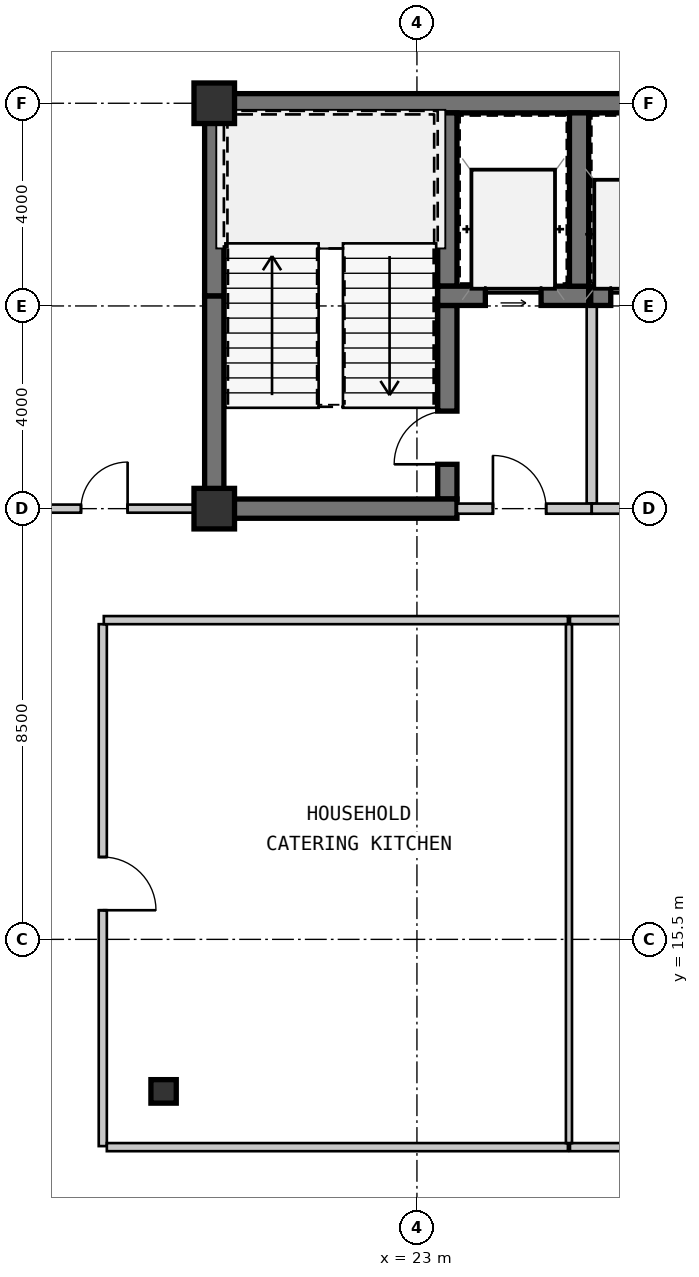
"""IFC4 building model, lengths in metres.
Left out: names, types, materials, properties, quantities, classifications, styles, units other than length and angle.
Written with IfcOpenShell. Run it as: python <this file> out.ifc"""

import sys

from ifc_helpers import new_model, si_unit, direction, frame, frame_2d, origin, origin_2d, place, context, subcontext, project, spatial, rectangle, i_section, extrude, source, transform, mapped, element, fill, save


model = new_model("IFC4")
c1 = context("Model", 3, precision=1e-05, world=origin(), true_north=direction((0.0, 1.0)))
c2 = subcontext(c1, "Body", "Model", "MODEL_VIEW")
j1 = project(units=[si_unit("LENGTHUNIT", "METRE"), si_unit("PLANEANGLEUNIT", "RADIAN")], contexts=[c1])
p1 = place(None, origin())
s1 = spatial("IfcSite", under=j1, at=p1, CompositionType="ELEMENT")
p2 = place(p1, origin())
s2 = spatial("IfcBuilding", under=s1, at=p2, CompositionType="ELEMENT")
p3 = place(p2, frame((0.0, 0.0, 57.75)))
s3 = spatial("IfcBuildingStorey", under=s2, at=p3, CompositionType="ELEMENT", Elevation=57.75)
m1 = source(origin(), c2, "Body", "SweptSolid", [
    extrude(rectangle(XDim=0.8, YDim=0.8, at=origin_2d()), origin(), (0.0, 0.0, 1.0), 3.15),
])
for number, where, z_axis, x_axis in (
    (1, (19.0, 24.0, 0.0), (0.0, 0.0, 1.0), (1.0, 0.0, 0.0)),
    (2, (19.0, 32.0, 0.0), (0.0, 0.0, 1.0), (1.0, 0.0, 0.0)),
):
    element("IfcColumn", number, at=place(p3, frame(where, z_axis=z_axis, x_axis=x_axis)), inside=s3, PredefinedType="COLUMN", context=c2, shape_type="MappedRepresentation", body=[
        mapped(m1, transform((0.0, 0.0, 0.0), scale=1.0)),
    ])
m2 = source(origin(), c2, "Body", "SweptSolid", [
    extrude(i_section(OverallWidth=0.5, OverallDepth=0.464, WebThickness=0.022, FlangeThickness=0.034, at=origin_2d()), origin(), (0.0, 0.0, 1.0), 3.15),
])
p4 = place(p3, frame((18.0, 12.5, 0.0), z_axis=(0.0, 0.0, 1.0), x_axis=(1.0, 0.0, 0.0)))
e3 = element("IfcColumn", 3, at=p4, inside=s3, PredefinedType="COLUMN", context=c2, shape_type="MappedRepresentation", body=[
    mapped(m2, transform((0.0, 0.0, 0.0), scale=1.0)),
])
m3 = source(origin(), c2, "Body", "SweptSolid", [
    extrude(rectangle(XDim=9.19, YDim=0.38, at=frame_2d((4.595, 0.0))), origin(), (0.0, 0.0, 1.0), 2.87),
])
p5 = place(p3, frame((18.81, 32.0, 0.0), z_axis=(0.0, 0.0, 1.0), x_axis=(1.0, 0.0, 0.0)))
e4 = element("IfcWall", 4, at=p5, inside=s3, PredefinedType="SHEAR", context=c2, shape_type="MappedRepresentation", body=[
    mapped(m3, transform((0.0, 0.0, 0.0), scale=1.0)),
])
m4 = source(origin(), c2, "Body", "SweptSolid", [
    extrude(rectangle(XDim=4.01, YDim=0.38, at=frame_2d((2.005, 0.0))), origin(), (0.0, 0.0, 1.0), 2.87),
])
p6 = place(p3, frame((19.0, 24.19, 0.0), z_axis=(0.0, 0.0, 1.0), x_axis=(0.0, 1.0, 0.0)))
e5 = element("IfcWall", 5, at=p6, inside=s3, PredefinedType="SHEAR", context=c2, shape_type="MappedRepresentation", body=[
    mapped(m4, transform((0.0, 0.0, 0.0), scale=1.0)),
])
m5 = source(origin(), c2, "Body", "SweptSolid", [
    extrude(rectangle(XDim=3.61, YDim=0.38, at=frame_2d((1.805, 0.0))), origin(), (0.0, 0.0, 1.0), 2.87),
])
p7 = place(p3, frame((19.0, 28.2, 0.0), z_axis=(0.0, 0.0, 1.0), x_axis=(0.0, 1.0, 0.0)))
e6 = element("IfcWall", 6, at=p7, inside=s3, PredefinedType="SHEAR", context=c2, shape_type="MappedRepresentation", body=[
    mapped(m5, transform((0.0, 0.0, 0.0), scale=1.0)),
])
m6 = source(origin(), c2, "Body", "SweptSolid", [
    extrude(rectangle(XDim=3.42, YDim=0.38, at=frame_2d((1.71, 0.0))), origin(), (0.0, 0.0, 1.0), 2.87),
])
p8 = place(p3, frame((23.6, 28.39, 0.0), z_axis=(0.0, 0.0, 1.0), x_axis=(0.0, 1.0, 0.0)))
e7 = element("IfcWall", 7, at=p8, inside=s3, PredefinedType="SHEAR", context=c2, shape_type="MappedRepresentation", body=[
    mapped(m6, transform((0.0, 0.0, 0.0), scale=1.0)),
])
m7 = source(origin(), c2, "Body", "SweptSolid", [
    extrude(rectangle(XDim=3.82, YDim=0.38, at=frame_2d((1.91, 0.0))), origin(), (0.0, 0.0, 1.0), 2.87),
])
p9 = place(p3, frame((23.6, 24.19, 0.0), z_axis=(0.0, 0.0, 1.0), x_axis=(0.0, 1.0, 0.0)))
e8 = element("IfcWall", 8, at=p9, inside=s3, PredefinedType="SHEAR", context=c2, shape_type="MappedRepresentation", body=[
    mapped(m7, transform((0.0, 0.0, 0.0), scale=1.0)),
])
m8 = source(origin(), c2, "Body", "SweptSolid", [
    extrude(rectangle(XDim=1.05, YDim=2.1, at=frame_2d((0.525, 1.05))), frame((0.0, 0.2, 0.0), z_axis=(0.0, -1.0, 0.0), x_axis=(1.0, 0.0, 0.0)), (0.0, 0.0, 1.0), 0.4),
])
p10 = place(p9, frame((0.685, 0.0, 0.0)))
e9 = element("IfcOpeningElement", 9, at=p10, cuts=e8, PredefinedType="OPENING", context=c2, shape_type="MappedRepresentation", body=[
    mapped(m8, transform((0.0, 0.0, 0.0), scale=1.0)),
])
m9 = source(origin(), c2, "Body", "SweptSolid", [
    extrude(rectangle(XDim=4.98, YDim=0.38, at=frame_2d((2.49, 0.0))), origin(), (0.0, 0.0, 1.0), 2.87),
])
p11 = place(p3, frame((18.81, 24.0, 0.0), z_axis=(0.0, 0.0, 1.0), x_axis=(1.0, 0.0, 0.0)))
e10 = element("IfcWall", 10, at=p11, inside=s3, PredefinedType="SHEAR", context=c2, shape_type="MappedRepresentation", body=[
    mapped(m9, transform((0.0, 0.0, 0.0), scale=1.0)),
])
m10 = source(origin(), c2, "Body", "SweptSolid", [
    extrude(rectangle(XDim=2.98, YDim=0.38, at=frame_2d((1.49, 0.0))), origin(), (0.0, 0.0, 1.0), 2.87),
])
p12 = place(p3, frame((23.41, 28.2, 0.0), z_axis=(0.0, 0.0, 1.0), x_axis=(1.0, 0.0, 0.0)))
e11 = element("IfcWall", 11, at=p12, inside=s3, PredefinedType="SHEAR", context=c2, shape_type="MappedRepresentation", body=[
    mapped(m10, transform((0.0, 0.0, 0.0), scale=1.0)),
])
m11 = source(origin(), c2, "Body", "SweptSolid", [
    extrude(rectangle(XDim=1.1, YDim=2.15, at=frame_2d((0.55, 1.075))), frame((0.0, 0.2, 0.0), z_axis=(0.0, -1.0, 0.0), x_axis=(1.0, 0.0, 0.0)), (0.0, 0.0, 1.0), 0.4),
])
p13 = place(p12, frame((0.94, 0.0, 0.0)))
e12 = element("IfcOpeningElement", 12, at=p13, cuts=e11, PredefinedType="OPENING", context=c2, shape_type="MappedRepresentation", body=[
    mapped(m11, transform((0.0, 0.0, 0.0), scale=1.0)),
])
p14 = place(p3, frame((26.2, 28.39, 0.0), z_axis=(0.0, 0.0, 1.0), x_axis=(0.0, 1.0, 0.0)))
e13 = element("IfcWall", 13, at=p14, inside=s3, PredefinedType="SHEAR", context=c2, shape_type="MappedRepresentation", body=[
    mapped(m6, transform((0.0, 0.0, 0.0), scale=1.0)),
])
m12 = source(origin(), c2, "Body", "SweptSolid", [
    extrude(rectangle(XDim=3.91, YDim=0.2, at=frame_2d((1.955, 0.0))), origin(), (0.0, 0.0, 1.0), 2.87),
])
p15 = place(p3, frame((26.45, 24.1, 0.0), z_axis=(0.0, 0.0, 1.0), x_axis=(0.0, 1.0, 0.0)))
e14 = element("IfcWall", 14, at=p15, inside=s3, PredefinedType="SOLIDWALL", context=c2, shape_type="MappedRepresentation", body=[
    mapped(m12, transform((0.0, 0.0, 0.0), scale=1.0)),
])
m13 = source(origin(), c2, "Body", "SweptSolid", [
    extrude(rectangle(XDim=2.66, YDim=0.2, at=frame_2d((1.33, 0.0))), origin(), (0.0, 0.0, 1.0), 2.41),
])
p16 = place(p3, frame((23.79, 24.0, 0.0), z_axis=(0.0, 0.0, 1.0), x_axis=(1.0, 0.0, 0.0)))
e15 = element("IfcWall", 15, at=p16, inside=s3, PredefinedType="SOLIDWALL", context=c2, shape_type="MappedRepresentation", body=[
    mapped(m13, transform((0.0, 0.0, 0.0), scale=1.0)),
])
m14 = source(origin(), c2, "Body", "SweptSolid", [
    extrude(rectangle(XDim=1.05, YDim=2.1, at=frame_2d((0.525, 1.05))), frame((0.0, 0.11, 0.0), z_axis=(0.0, -1.0, 0.0), x_axis=(1.0, 0.0, 0.0)), (0.0, 0.0, 1.0), 0.22),
])
p17 = place(p16, frame((0.71, 0.0, 0.0)))
e16 = element("IfcOpeningElement", 16, at=p17, cuts=e15, PredefinedType="OPENING", context=c2, shape_type="MappedRepresentation", body=[
    mapped(m14, transform((0.0, 0.0, 0.0), scale=1.0)),
])
m15 = source(origin(), c2, "Body", "SweptSolid", [
    extrude(rectangle(XDim=2.07, YDim=0.38, at=frame_2d((1.035, 0.0))), origin(), (0.0, 0.0, 1.0), 2.87),
])
p18 = place(p3, frame((26.43, 28.2, 0.0), z_axis=(0.0, 0.0, 1.0), x_axis=(1.0, 0.0, 0.0)))
e17 = element("IfcWall", 17, at=p18, inside=s3, PredefinedType="SHEAR", context=c2, shape_type="MappedRepresentation", body=[
    mapped(m15, transform((0.0, 0.0, 0.0), scale=1.0)),
])
m16 = source(origin(), c2, "Body", "SweptSolid", [
    extrude(rectangle(XDim=1.05, YDim=2.15, at=frame_2d((0.525, 1.075))), frame((0.0, 0.2, 0.0), z_axis=(0.0, -1.0, 0.0), x_axis=(1.0, 0.0, 0.0)), (0.0, 0.0, 1.0), 0.4),
])
p19 = place(p18, frame((0.395, 0.0, 0.0)))
e18 = element("IfcOpeningElement", 18, at=p19, cuts=e17, PredefinedType="OPENING", context=c2, shape_type="MappedRepresentation", body=[
    mapped(m16, transform((0.0, 0.0, 0.0), scale=1.0)),
])
m17 = source(origin(), c2, "Body", "SweptSolid", [
    extrude(rectangle(XDim=4.35, YDim=0.2, at=frame_2d((2.175, 0.0))), origin(), (0.0, 0.0, 1.0), 2.41),
])
p20 = place(p3, frame((30.8, 24.0, 0.0), z_axis=(0.0, 0.0, 1.0), x_axis=(-1.0, 0.0, 0.0)))
e19 = element("IfcWall", 19, at=p20, inside=s3, PredefinedType="SOLIDWALL", context=c2, shape_type="MappedRepresentation", body=[
    mapped(m17, transform((0.0, 0.0, 0.0), scale=1.0)),
])
p21 = place(p20, frame((0.75, 0.0, 0.0)))
e20 = element("IfcOpeningElement", 20, at=p21, cuts=e19, PredefinedType="OPENING", context=c2, shape_type="MappedRepresentation", body=[
    mapped(m14, transform((0.0, 0.0, 0.0), scale=1.0)),
])
m18 = source(origin(), c2, "Body", "SweptSolid", [
    extrude(rectangle(XDim=10.3, YDim=0.16, at=frame_2d((5.15, 0.0))), origin(), (0.0, 0.0, 1.0), 2.87),
])
p22 = place(p3, frame((16.8, 21.72, 0.0), z_axis=(0.0, 0.0, 1.0), x_axis=(0.0, -1.0, 0.0)))
e21 = element("IfcWall", 21, at=p22, inside=s3, PredefinedType="PARTITIONING", context=c2, shape_type="MappedRepresentation", body=[
    mapped(m18, transform((0.0, 0.0, 0.0), scale=1.0)),
])
m19 = source(origin(), c2, "Body", "SweptSolid", [
    extrude(rectangle(XDim=1.05, YDim=2.1, at=frame_2d((0.525, 1.05))), frame((0.0, 0.09, 0.0), z_axis=(0.0, -1.0, 0.0), x_axis=(1.0, 0.0, 0.0)), (0.0, 0.0, 1.0), 0.18),
])
p23 = place(p22, frame((4.595, 0.0, 0.0)))
e22 = element("IfcOpeningElement", 22, at=p23, cuts=e21, PredefinedType="OPENING", context=c2, shape_type="MappedRepresentation", body=[
    mapped(m19, transform((0.0, 0.0, 0.0), scale=1.0)),
])
m20 = source(origin(), c2, "Body", "SweptSolid", [
    extrude(rectangle(XDim=9.159, YDim=0.16, at=frame_2d((4.58, 0.0))), origin(), (0.0, 0.0, 1.0), 2.87),
])
p24 = place(p3, frame((25.98, 21.8, 0.0), z_axis=(0.0, 0.0, 1.0), x_axis=(-1.0, 0.0, 0.0)))
e23 = element("IfcWall", 23, at=p24, inside=s3, PredefinedType="PARTITIONING", context=c2, shape_type="MappedRepresentation", body=[
    mapped(m20, transform((0.0, 0.0, 0.0), scale=1.0)),
])
m21 = source(origin(), c2, "Body", "SweptSolid", [
    extrude(rectangle(XDim=9.959, YDim=0.16, at=frame_2d((4.98, 0.0))), origin(), (0.0, 0.0, 1.0), 2.87),
])
p25 = place(p3, frame((35.98, 21.8, 0.0), z_axis=(0.0, 0.0, 1.0), x_axis=(-1.0, 0.0, 0.0)))
e24 = element("IfcWall", 24, at=p25, inside=s3, PredefinedType="PARTITIONING", context=c2, shape_type="MappedRepresentation", body=[
    mapped(m21, transform((0.0, 0.0, 0.0), scale=1.0)),
])
p26 = place(p25, frame((4.455, 0.0, 0.0)))
e25 = element("IfcOpeningElement", 25, at=p26, cuts=e24, PredefinedType="OPENING", context=c2, shape_type="MappedRepresentation", body=[
    mapped(m19, transform((0.0, 0.0, 0.0), scale=1.0)),
])
m22 = source(origin(), c2, "Body", "SweptSolid", [
    extrude(rectangle(XDim=4.13, YDim=0.16, at=frame_2d((2.065, 0.0))), origin(), (0.0, 0.0, 1.0), 2.87),
])
p27 = place(p3, frame((14.68, 24.0, 0.0), z_axis=(0.0, 0.0, 1.0), x_axis=(1.0, 0.0, 0.0)))
e26 = element("IfcWall", 26, at=p27, inside=s3, PredefinedType="PARTITIONING", context=c2, shape_type="MappedRepresentation", body=[
    mapped(m22, transform((0.0, 0.0, 0.0), scale=1.0)),
])
m23 = source(origin(), c2, "Body", "SweptSolid", [
    extrude(rectangle(XDim=0.92, YDim=2.1, at=frame_2d((0.46, 1.05))), frame((0.0, 0.09, 0.0), z_axis=(0.0, -1.0, 0.0), x_axis=(1.0, 0.0, 0.0)), (0.0, 0.0, 1.0), 0.18),
])
p28 = place(p27, frame((1.69, 0.0, 0.0)))
e27 = element("IfcOpeningElement", 27, at=p28, cuts=e26, PredefinedType="OPENING", context=c2, shape_type="MappedRepresentation", body=[
    mapped(m23, transform((0.0, 0.0, 0.0), scale=1.0)),
])
m24 = source(origin(), c2, "Body", "SweptSolid", [
    extrude(rectangle(XDim=9.1, YDim=0.16, at=frame_2d((4.55, 0.0))), origin(), (0.0, 0.0, 1.0), 2.87),
])
p29 = place(p3, frame((16.88, 11.4, 0.0), z_axis=(0.0, 0.0, 1.0), x_axis=(1.0, 0.0, 0.0)))
e28 = element("IfcWall", 28, at=p29, inside=s3, PredefinedType="PARTITIONING", context=c2, shape_type="MappedRepresentation", body=[
    mapped(m24, transform((0.0, 0.0, 0.0), scale=1.0)),
])
p30 = place(p3, frame((26.02, 11.4, 0.0), z_axis=(0.0, 0.0, 1.0), x_axis=(1.0, 0.0, 0.0)))
e29 = element("IfcWall", 29, at=p30, inside=s3, PredefinedType="PARTITIONING", context=c2, shape_type="MappedRepresentation", body=[
    mapped(m21, transform((0.0, 0.0, 0.0), scale=1.0)),
])
m25 = source(origin(), c2, "Body", "SweptSolid", [
    extrude(rectangle(XDim=10.24, YDim=0.12, at=frame_2d((5.12, 0.0))), origin(), (0.0, 0.0, 1.0), 2.87),
])
p31 = place(p3, frame((26.0, 21.72, 0.0), z_axis=(0.0, 0.0, 1.0), x_axis=(0.0, -1.0, 0.0)))
e30 = element("IfcWall", 30, at=p31, inside=s3, PredefinedType="PARTITIONING", context=c2, shape_type="MappedRepresentation", body=[
    mapped(m25, transform((0.0, 0.0, 0.0), scale=1.0)),
])
m26 = source(origin(), c2, "Body", "SweptSolid", [
    extrude(rectangle(XDim=1.05, YDim=2.1, at=frame_2d((0.525, 1.05))), frame((0.0, 0.025, 0.0), z_axis=(0.0, -1.0, 0.0), x_axis=(1.0, 0.0, 0.0)), (0.0, 0.0, 1.0), 0.05),
])
p32 = place(p10, origin())
e31 = element("IfcDoor", 31, at=p32, inside=s3, OperationType="SINGLE_SWING_LEFT", PredefinedType="DOOR", context=c2, shape_type="MappedRepresentation", body=[
    mapped(m26, transform((0.0, 0.0, 0.0), scale=1.0)),
])
fill(e9, e31)
m27 = source(origin(), c2, "Body", "SweptSolid", [
    extrude(rectangle(XDim=1.1, YDim=2.15, at=frame_2d((0.55, 1.075))), frame((0.0, 0.025, 0.0), z_axis=(0.0, -1.0, 0.0), x_axis=(1.0, 0.0, 0.0)), (0.0, 0.0, 1.0), 0.05),
])
p33 = place(p13, origin())
e32 = element("IfcDoor", 32, at=p33, inside=s3, OperationType="SLIDING_TO_LEFT", PredefinedType="DOOR", context=c2, shape_type="MappedRepresentation", body=[
    mapped(m27, transform((0.0, 0.0, 0.0), scale=1.0)),
])
fill(e12, e32)
p34 = place(p17, origin())
e33 = element("IfcDoor", 33, at=p34, inside=s3, OperationType="SINGLE_SWING_LEFT", PredefinedType="DOOR", context=c2, shape_type="MappedRepresentation", body=[
    mapped(m26, transform((0.0, 0.0, 0.0), scale=1.0)),
])
fill(e16, e33)
m28 = source(origin(), c2, "Body", "SweptSolid", [
    extrude(rectangle(XDim=1.05, YDim=2.15, at=frame_2d((0.525, 1.075))), frame((0.0, 0.025, 0.0), z_axis=(0.0, -1.0, 0.0), x_axis=(1.0, 0.0, 0.0)), (0.0, 0.0, 1.0), 0.05),
])
p35 = place(p19, origin())
e34 = element("IfcDoor", 34, at=p35, inside=s3, OperationType="SLIDING_TO_LEFT", PredefinedType="DOOR", context=c2, shape_type="MappedRepresentation", body=[
    mapped(m28, transform((0.0, 0.0, 0.0), scale=1.0)),
])
fill(e18, e34)
p36 = place(p23, origin())
e35 = element("IfcDoor", 35, at=p36, inside=s3, OperationType="SINGLE_SWING_RIGHT", PredefinedType="DOOR", context=c2, shape_type="MappedRepresentation", body=[
    mapped(m26, transform((0.0, 0.0, 0.0), scale=1.0)),
])
fill(e22, e35)
m29 = source(origin(), c2, "Body", "SweptSolid", [
    extrude(rectangle(XDim=0.92, YDim=2.1, at=frame_2d((0.46, 1.05))), frame((0.0, 0.025, 0.0), z_axis=(0.0, -1.0, 0.0), x_axis=(1.0, 0.0, 0.0)), (0.0, 0.0, 1.0), 0.05),
])
p37 = place(p28, origin())
e36 = element("IfcDoor", 36, at=p37, inside=s3, OperationType="SINGLE_SWING_RIGHT", PredefinedType="DOOR", context=c2, shape_type="MappedRepresentation", body=[
    mapped(m29, transform((0.0, 0.0, 0.0), scale=1.0)),
])
fill(e27, e36)
save(model, sys.argv[1])
